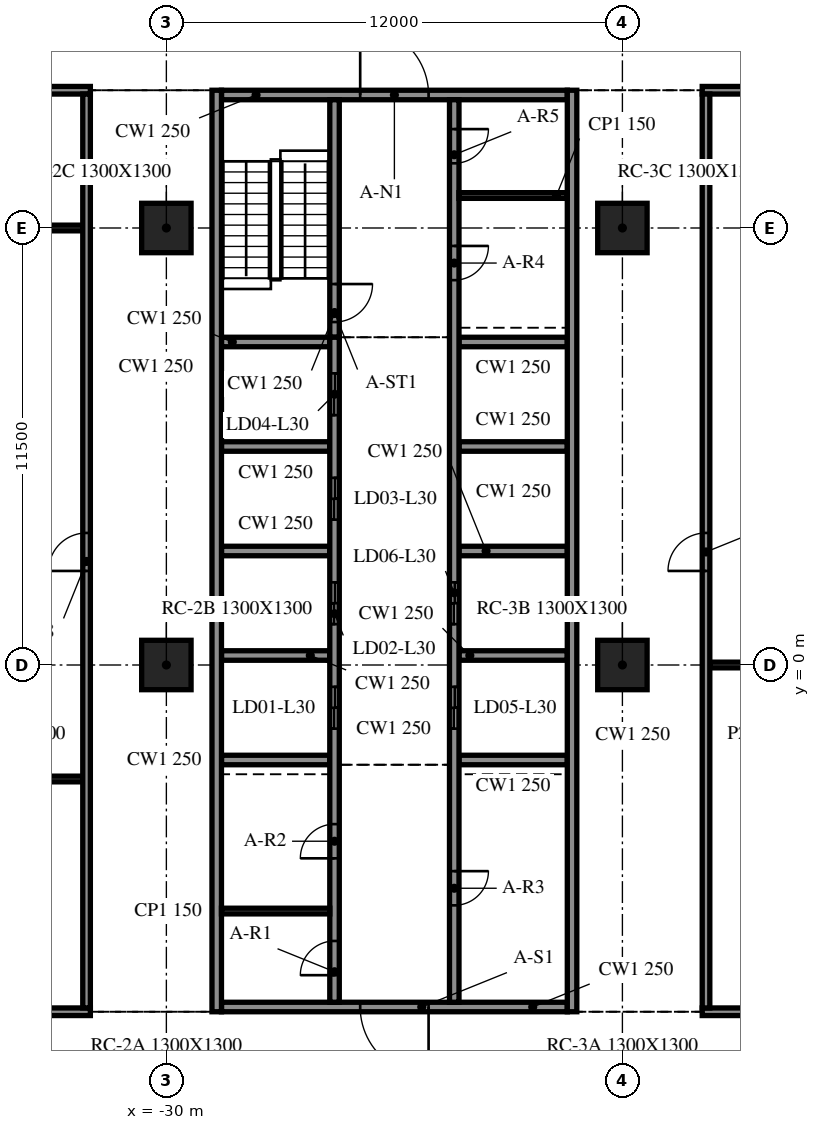
"""IFC4 building model, lengths in metres.
Left out: names, types, materials, properties, quantities, classifications, styles, units other than length and angle.
Written with IfcOpenShell. Run it as: python <this file> out.ifc"""

import sys

from ifc_helpers import new_model, si_unit, direction, frame, frame_2d, origin, origin_2d, place, context, subcontext, project, spatial, rectangle, extrude, element, fill, save


model = new_model("IFC4")
c1 = context("Model", 3, precision=1e-05, world=origin(), true_north=direction((0.0, 1.0)))
c2 = subcontext(c1, "Body", "Model", "MODEL_VIEW")
j1 = project(units=[si_unit("LENGTHUNIT", "METRE"), si_unit("PLANEANGLEUNIT", "RADIAN")], contexts=[c1])
p1 = place(None, origin())
s1 = spatial("IfcSite", under=j1, at=p1, CompositionType="ELEMENT")
p2 = place(p1, origin())
s2 = spatial("IfcBuilding", under=s1, at=p2, CompositionType="ELEMENT")
p3 = place(p2, frame((0.0, 0.0, 130.2)))
s3 = spatial("IfcBuildingStorey", under=s2, at=p3, CompositionType="ELEMENT", Elevation=130.2)
for number, where, z_axis, x_axis in (
    (1, (-30.0, 0.0, -0.34), (0.0, 0.0, 1.0), (1.0, 0.0, 0.0)),
    (2, (-30.0, 11.5, -0.34), (0.0, 0.0, 1.0), (1.0, 0.0, 0.0)),
    (3, (-18.0, 0.0, -0.34), (0.0, 0.0, 1.0), (1.0, 0.0, 0.0)),
    (4, (-18.0, 11.5, -0.34), (0.0, 0.0, 1.0), (1.0, 0.0, 0.0)),
):
    element("IfcColumn", number, at=place(p3, frame(where, z_axis=z_axis, x_axis=x_axis)), inside=s3, PredefinedType="COLUMN", context=c2, shape_type="SweptSolid", body=[
        extrude(rectangle(XDim=1.3, YDim=1.3, at=origin_2d()), origin(), (0.0, 0.0, 1.0), 4.1),
    ])
for number, where, z_axis, x_axis in (
    (5, (-28.675, 15.125, 0.0), (0.0, 0.0, 1.0), (0.0, -1.0, 0.0)),
    (6, (-19.325, -9.125, 0.0), (0.0, 0.0, 1.0), (0.0, 1.0, 0.0)),
):
    element("IfcWall", number, at=place(p3, frame(where, z_axis=z_axis, x_axis=x_axis)), inside=s3, PredefinedType="SOLIDWALL", context=c2, shape_type="SweptSolid", body=[
        extrude(rectangle(XDim=24.25, YDim=0.25, at=frame_2d((12.125, 0.0))), origin(), (0.0, 0.0, 1.0), 3.76),
    ])
p4 = place(p3, frame((-19.45, -9.0, 0.0), z_axis=(0.0, 0.0, 1.0), x_axis=(-1.0, 0.0, 0.0)))
e7 = element("IfcWall", 7, at=p4, inside=s3, PredefinedType="SOLIDWALL", context=c2, shape_type="SweptSolid", body=[
    extrude(rectangle(XDim=9.1, YDim=0.25, at=frame_2d((4.55, 0.0))), origin(), (0.0, 0.0, 1.0), 3.76),
])
p5 = place(p4, frame((3.65, 0.0, 0.0)))
e8 = element("IfcOpeningElement", 8, at=p5, cuts=e7, PredefinedType="OPENING", context=c2, shape_type="SweptSolid", body=[
    extrude(rectangle(XDim=1.8, YDim=2.1, at=frame_2d((0.9, 1.05))), frame((0.0, 0.135, 0.0), z_axis=(0.0, -1.0, 0.0), x_axis=(1.0, 0.0, 0.0)), (0.0, 0.0, 1.0), 0.27),
])
p6 = place(p3, frame((-28.55, 15.0, 0.0), z_axis=(0.0, 0.0, 1.0), x_axis=(1.0, 0.0, 0.0)))
e9 = element("IfcWall", 9, at=p6, inside=s3, PredefinedType="SOLIDWALL", context=c2, shape_type="SweptSolid", body=[
    extrude(rectangle(XDim=9.1, YDim=0.25, at=frame_2d((4.55, 0.0))), origin(), (0.0, 0.0, 1.0), 3.76),
])
p7 = place(p6, frame((3.65, 0.0, 0.0)))
e10 = element("IfcOpeningElement", 10, at=p7, cuts=e9, PredefinedType="OPENING", context=c2, shape_type="SweptSolid", body=[
    extrude(rectangle(XDim=1.8, YDim=2.1, at=frame_2d((0.9, 1.05))), frame((0.0, 0.135, 0.0), z_axis=(0.0, -1.0, 0.0), x_axis=(1.0, 0.0, 0.0)), (0.0, 0.0, 1.0), 0.27),
])
p8 = place(p3, frame((-25.575, -8.875, 0.0), z_axis=(0.0, 0.0, 1.0), x_axis=(0.0, 1.0, 0.0)))
e11 = element("IfcWall", 11, at=p8, inside=s3, PredefinedType="SOLIDWALL", context=c2, shape_type="SweptSolid", body=[
    extrude(rectangle(XDim=17.5, YDim=0.25, at=frame_2d((8.75, 0.0))), origin(), (0.0, 0.0, 1.0), 3.76),
])
p9 = place(p8, frame((7.2, 0.0, 0.0)))
e12 = element("IfcOpeningElement", 12, at=p9, cuts=e11, PredefinedType="OPENING", context=c2, shape_type="SweptSolid", body=[
    extrude(rectangle(XDim=1.1, YDim=2.1, at=frame_2d((0.55, 1.05))), frame((0.0, 0.135, 0.0), z_axis=(0.0, -1.0, 0.0), x_axis=(1.0, 0.0, 0.0)), (0.0, 0.0, 1.0), 0.27),
])
p10 = place(p8, frame((9.95, 0.0, 0.0)))
e13 = element("IfcOpeningElement", 13, at=p10, cuts=e11, PredefinedType="OPENING", context=c2, shape_type="SweptSolid", body=[
    extrude(rectangle(XDim=1.1, YDim=2.1, at=frame_2d((0.55, 1.05))), frame((0.0, 0.135, 0.0), z_axis=(0.0, -1.0, 0.0), x_axis=(1.0, 0.0, 0.0)), (0.0, 0.0, 1.0), 0.27),
])
p11 = place(p8, frame((12.7, 0.0, 0.0)))
e14 = element("IfcOpeningElement", 14, at=p11, cuts=e11, PredefinedType="OPENING", context=c2, shape_type="SweptSolid", body=[
    extrude(rectangle(XDim=1.1, YDim=2.1, at=frame_2d((0.55, 1.05))), frame((0.0, 0.135, 0.0), z_axis=(0.0, -1.0, 0.0), x_axis=(1.0, 0.0, 0.0)), (0.0, 0.0, 1.0), 0.27),
])
p12 = place(p8, frame((15.45, 0.0, 0.0)))
e15 = element("IfcOpeningElement", 15, at=p12, cuts=e11, PredefinedType="OPENING", context=c2, shape_type="SweptSolid", body=[
    extrude(rectangle(XDim=1.1, YDim=2.1, at=frame_2d((0.55, 1.05))), frame((0.0, 0.135, 0.0), z_axis=(0.0, -1.0, 0.0), x_axis=(1.0, 0.0, 0.0)), (0.0, 0.0, 1.0), 0.27),
])
p13 = place(p8, frame((0.712, 0.0, 0.0)))
e16 = element("IfcOpeningElement", 16, at=p13, cuts=e11, PredefinedType="OPENING", context=c2, shape_type="SweptSolid", body=[
    extrude(rectangle(XDim=0.9, YDim=2.1, at=frame_2d((0.45, 1.05))), frame((0.0, 0.135, 0.0), z_axis=(0.0, -1.0, 0.0), x_axis=(1.0, 0.0, 0.0)), (0.0, 0.0, 1.0), 0.27),
])
p14 = place(p8, frame((3.788, 0.0, 0.0)))
e17 = element("IfcOpeningElement", 17, at=p14, cuts=e11, PredefinedType="OPENING", context=c2, shape_type="SweptSolid", body=[
    extrude(rectangle(XDim=0.9, YDim=2.1, at=frame_2d((0.45, 1.05))), frame((0.0, 0.135, 0.0), z_axis=(0.0, -1.0, 0.0), x_axis=(1.0, 0.0, 0.0)), (0.0, 0.0, 1.0), 0.27),
])
p15 = place(p3, frame((-25.575, 14.875, 0.0), z_axis=(0.0, 0.0, 1.0), x_axis=(0.0, -1.0, 0.0)))
e18 = element("IfcWall", 18, at=p15, inside=s3, PredefinedType="SOLIDWALL", context=c2, shape_type="SweptSolid", body=[
    extrude(rectangle(XDim=6.25, YDim=0.25, at=frame_2d((3.125, 0.0))), origin(), (0.0, 0.0, 1.0), 3.76),
])
p16 = place(p15, frame((4.85, 0.0, 0.0)))
e19 = element("IfcOpeningElement", 19, at=p16, cuts=e18, PredefinedType="OPENING", context=c2, shape_type="SweptSolid", body=[
    extrude(rectangle(XDim=1.0, YDim=2.1, at=frame_2d((0.5, 1.05))), frame((0.0, 0.135, 0.0), z_axis=(0.0, -1.0, 0.0), x_axis=(1.0, 0.0, 0.0)), (0.0, 0.0, 1.0), 0.27),
])
p17 = place(p3, frame((-22.425, 14.875, 0.0), z_axis=(0.0, 0.0, 1.0), x_axis=(0.0, -1.0, 0.0)))
e20 = element("IfcWall", 20, at=p17, inside=s3, PredefinedType="SOLIDWALL", context=c2, shape_type="SweptSolid", body=[
    extrude(rectangle(XDim=23.75, YDim=0.25, at=frame_2d((11.875, 0.0))), origin(), (0.0, 0.0, 1.0), 3.76),
])
p18 = place(p17, frame((15.45, 0.0, 0.0)))
e21 = element("IfcOpeningElement", 21, at=p18, cuts=e20, PredefinedType="OPENING", context=c2, shape_type="SweptSolid", body=[
    extrude(rectangle(XDim=1.1, YDim=2.1, at=frame_2d((0.55, 1.05))), frame((0.0, 0.135, 0.0), z_axis=(0.0, -1.0, 0.0), x_axis=(1.0, 0.0, 0.0)), (0.0, 0.0, 1.0), 0.27),
])
p19 = place(p17, frame((12.7, 0.0, 0.0)))
e22 = element("IfcOpeningElement", 22, at=p19, cuts=e20, PredefinedType="OPENING", context=c2, shape_type="SweptSolid", body=[
    extrude(rectangle(XDim=1.1, YDim=2.1, at=frame_2d((0.55, 1.05))), frame((0.0, 0.135, 0.0), z_axis=(0.0, -1.0, 0.0), x_axis=(1.0, 0.0, 0.0)), (0.0, 0.0, 1.0), 0.27),
])
p20 = place(p17, frame((20.3, 0.0, 0.0)))
e23 = element("IfcOpeningElement", 23, at=p20, cuts=e20, PredefinedType="OPENING", context=c2, shape_type="SweptSolid", body=[
    extrude(rectangle(XDim=0.9, YDim=2.1, at=frame_2d((0.45, 1.05))), frame((0.0, 0.135, 0.0), z_axis=(0.0, -1.0, 0.0), x_axis=(1.0, 0.0, 0.0)), (0.0, 0.0, 1.0), 0.27),
])
p21 = place(p17, frame((3.847, 0.0, 0.0)))
e24 = element("IfcOpeningElement", 24, at=p21, cuts=e20, PredefinedType="OPENING", context=c2, shape_type="SweptSolid", body=[
    extrude(rectangle(XDim=0.9, YDim=2.1, at=frame_2d((0.45, 1.05))), frame((0.0, 0.135, 0.0), z_axis=(0.0, -1.0, 0.0), x_axis=(1.0, 0.0, 0.0)), (0.0, 0.0, 1.0), 0.27),
])
p22 = place(p17, frame((0.772, 0.0, 0.0)))
e25 = element("IfcOpeningElement", 25, at=p22, cuts=e20, PredefinedType="OPENING", context=c2, shape_type="SweptSolid", body=[
    extrude(rectangle(XDim=0.9, YDim=2.1, at=frame_2d((0.45, 1.05))), frame((0.0, 0.135, 0.0), z_axis=(0.0, -1.0, 0.0), x_axis=(1.0, 0.0, 0.0)), (0.0, 0.0, 1.0), 0.27),
])
for number, where, z_axis, x_axis in (
    (26, (-28.55, -2.5, 0.0), (0.0, 0.0, 1.0), (1.0, 0.0, 0.0)),
    (27, (-28.55, 0.25, 0.0), (0.0, 0.0, 1.0), (1.0, 0.0, 0.0)),
    (28, (-28.55, 3.0, 0.0), (0.0, 0.0, 1.0), (1.0, 0.0, 0.0)),
    (29, (-28.55, 5.75, 0.0), (0.0, 0.0, 1.0), (1.0, 0.0, 0.0)),
    (30, (-28.55, 8.5, 0.0), (0.0, 0.0, 1.0), (1.0, 0.0, 0.0)),
    (31, (-22.3, -2.5, 0.0), (0.0, 0.0, 1.0), (1.0, 0.0, 0.0)),
    (32, (-22.3, 0.25, 0.0), (0.0, 0.0, 1.0), (1.0, 0.0, 0.0)),
    (33, (-22.3, 3.0, 0.0), (0.0, 0.0, 1.0), (1.0, 0.0, 0.0)),
    (34, (-22.3, 5.75, 0.0), (0.0, 0.0, 1.0), (1.0, 0.0, 0.0)),
    (35, (-22.3, 8.5, 0.0), (0.0, 0.0, 1.0), (1.0, 0.0, 0.0)),
):
    element("IfcWall", number, at=place(p3, frame(where, z_axis=z_axis, x_axis=x_axis)), inside=s3, PredefinedType="SOLIDWALL", context=c2, shape_type="SweptSolid", body=[
        extrude(rectangle(XDim=2.85, YDim=0.25, at=frame_2d((1.425, 0.0))), origin(), (0.0, 0.0, 1.0), 3.76),
    ])
for number, where, z_axis, x_axis in (
    (36, (-28.55, -6.475, 0.0), (0.0, 0.0, 1.0), (1.0, 0.0, 0.0)),
    (37, (-22.3, 12.355, 0.0), (0.0, 0.0, 1.0), (1.0, 0.0, 0.0)),
):
    element("IfcWall", number, at=place(p3, frame(where, z_axis=z_axis, x_axis=x_axis)), inside=s3, PredefinedType="PARTITIONING", context=c2, shape_type="SweptSolid", body=[
        extrude(rectangle(XDim=2.85, YDim=0.15, at=frame_2d((1.425, 0.0))), origin(), (0.0, 0.0, 1.0), 3.76),
    ])
p23 = place(p3, frame((-45.95, -9.125, 0.0), z_axis=(0.0, 0.0, 1.0), x_axis=(1.0, 0.0, 0.0)))
e38 = element("IfcWall", 38, at=p23, inside=s3, PredefinedType="PARTITIONING", context=c2, shape_type="SweptSolid", body=[
    extrude(rectangle(XDim=13.95, YDim=0.2, at=frame_2d((6.975, 0.0))), origin(), (0.0, 0.0, 1.0), 3.76),
])
p24 = place(p23, frame((5.5, 0.0, 0.0)))
e39 = element("IfcOpeningElement", 39, at=p24, cuts=e38, PredefinedType="OPENING", context=c2, shape_type="SweptSolid", body=[
    extrude(rectangle(XDim=1.2, YDim=2.1, at=frame_2d((0.6, 1.05))), frame((0.0, 0.11, 0.0), z_axis=(0.0, -1.0, 0.0), x_axis=(1.0, 0.0, 0.0)), (0.0, 0.0, 1.0), 0.22),
])
p25 = place(p23, frame((7.3, 0.0, 0.0)))
e40 = element("IfcOpeningElement", 40, at=p25, cuts=e38, PredefinedType="OPENING", context=c2, shape_type="SweptSolid", body=[
    extrude(rectangle(XDim=1.2, YDim=2.1, at=frame_2d((0.6, 1.05))), frame((0.0, 0.11, 0.0), z_axis=(0.0, -1.0, 0.0), x_axis=(1.0, 0.0, 0.0)), (0.0, 0.0, 1.0), 0.22),
])
p26 = place(p3, frame((-15.9, -9.125, 0.0), z_axis=(0.0, 0.0, 1.0), x_axis=(1.0, 0.0, 0.0)))
e41 = element("IfcWall", 41, at=p26, inside=s3, PredefinedType="PARTITIONING", context=c2, shape_type="SweptSolid", body=[
    extrude(rectangle(XDim=7.7, YDim=0.2, at=frame_2d((3.85, 0.0))), origin(), (0.0, 0.0, 1.0), 3.76),
])
p27 = place(p26, frame((3.3, 0.0, 0.0)))
e42 = element("IfcOpeningElement", 42, at=p27, cuts=e41, PredefinedType="OPENING", context=c2, shape_type="SweptSolid", body=[
    extrude(rectangle(XDim=1.0, YDim=2.1, at=frame_2d((0.5, 1.05))), frame((0.0, 0.11, 0.0), z_axis=(0.0, -1.0, 0.0), x_axis=(1.0, 0.0, 0.0)), (0.0, 0.0, 1.0), 0.22),
])
p28 = place(p3, frame((-45.75, -3.0, 0.0), z_axis=(0.0, 0.0, 1.0), x_axis=(1.0, 0.0, 0.0)))
e43 = element("IfcWall", 43, at=p28, inside=s3, PredefinedType="PARTITIONING", context=c2, shape_type="SweptSolid", body=[
    extrude(rectangle(XDim=13.55, YDim=0.15, at=frame_2d((6.775, 0.0))), origin(), (0.0, 0.0, 1.0), 3.76),
])
p29 = place(p3, frame((-15.7, 0.0, 0.0), z_axis=(0.0, 0.0, 1.0), x_axis=(1.0, 0.0, 0.0)))
e44 = element("IfcWall", 44, at=p29, inside=s3, PredefinedType="PARTITIONING", context=c2, shape_type="SweptSolid", body=[
    extrude(rectangle(XDim=7.3, YDim=0.15, at=frame_2d((3.65, 0.0))), origin(), (0.0, 0.0, 1.0), 3.76),
])
p30 = place(p3, frame((-41.35, 11.5, 0.0), z_axis=(0.0, 0.0, 1.0), x_axis=(1.0, 0.0, 0.0)))
e45 = element("IfcWall", 45, at=p30, inside=s3, PredefinedType="PARTITIONING", context=c2, shape_type="SweptSolid", body=[
    extrude(rectangle(XDim=9.15, YDim=0.15, at=frame_2d((4.575, 0.0))), origin(), (0.0, 0.0, 1.0), 3.76),
])
p31 = place(p3, frame((-45.95, 15.125, 0.0), z_axis=(0.0, 0.0, 1.0), x_axis=(1.0, 0.0, 0.0)))
e46 = element("IfcWall", 46, at=p31, inside=s3, PredefinedType="PARTITIONING", context=c2, shape_type="SweptSolid", body=[
    extrude(rectangle(XDim=13.95, YDim=0.2, at=frame_2d((6.975, 0.0))), origin(), (0.0, 0.0, 1.0), 3.76),
])
p32 = place(p31, frame((5.7, 0.0, 0.0)))
e47 = element("IfcOpeningElement", 47, at=p32, cuts=e46, PredefinedType="OPENING", context=c2, shape_type="SweptSolid", body=[
    extrude(rectangle(XDim=1.0, YDim=2.1, at=frame_2d((0.5, 1.05))), frame((0.0, 0.11, 0.0), z_axis=(0.0, -1.0, 0.0), x_axis=(1.0, 0.0, 0.0)), (0.0, 0.0, 1.0), 0.22),
])
p33 = place(p31, frame((7.3, 0.0, 0.0)))
e48 = element("IfcOpeningElement", 48, at=p33, cuts=e46, PredefinedType="OPENING", context=c2, shape_type="SweptSolid", body=[
    extrude(rectangle(XDim=1.0, YDim=2.1, at=frame_2d((0.5, 1.05))), frame((0.0, 0.11, 0.0), z_axis=(0.0, -1.0, 0.0), x_axis=(1.0, 0.0, 0.0)), (0.0, 0.0, 1.0), 0.22),
])
p34 = place(p3, frame((-15.9, 15.125, 0.0), z_axis=(0.0, 0.0, 1.0), x_axis=(1.0, 0.0, 0.0)))
e49 = element("IfcWall", 49, at=p34, inside=s3, PredefinedType="PARTITIONING", context=c2, shape_type="SweptSolid", body=[
    extrude(rectangle(XDim=7.7, YDim=0.2, at=frame_2d((3.85, 0.0))), origin(), (0.0, 0.0, 1.0), 3.76),
])
p35 = place(p3, frame((-32.1, -9.025, 0.0), z_axis=(0.0, 0.0, 1.0), x_axis=(0.0, 1.0, 0.0)))
e50 = element("IfcWall", 50, at=p35, inside=s3, PredefinedType="PARTITIONING", context=c2, shape_type="SweptSolid", body=[
    extrude(rectangle(XDim=24.05, YDim=0.2, at=frame_2d((12.025, 0.0))), origin(), (0.0, 0.0, 1.0), 3.76),
])
p36 = place(p35, frame((11.5, 0.0, 0.0)))
e51 = element("IfcOpeningElement", 51, at=p36, cuts=e50, PredefinedType="OPENING", context=c2, shape_type="SweptSolid", body=[
    extrude(rectangle(XDim=1.0, YDim=2.1, at=frame_2d((0.5, 1.05))), frame((0.0, 0.11, 0.0), z_axis=(0.0, -1.0, 0.0), x_axis=(1.0, 0.0, 0.0)), (0.0, 0.0, 1.0), 0.22),
])
p37 = place(p3, frame((-15.8, -9.025, 0.0), z_axis=(0.0, 0.0, 1.0), x_axis=(0.0, 1.0, 0.0)))
e52 = element("IfcWall", 52, at=p37, inside=s3, PredefinedType="PARTITIONING", context=c2, shape_type="SweptSolid", body=[
    extrude(rectangle(XDim=24.05, YDim=0.2, at=frame_2d((12.025, 0.0))), origin(), (0.0, 0.0, 1.0), 3.76),
])
p38 = place(p37, frame((11.5, 0.0, 0.0)))
e53 = element("IfcOpeningElement", 53, at=p38, cuts=e52, PredefinedType="OPENING", context=c2, shape_type="SweptSolid", body=[
    extrude(rectangle(XDim=1.0, YDim=2.1, at=frame_2d((0.5, 1.05))), frame((0.0, 0.11, 0.0), z_axis=(0.0, -1.0, 0.0), x_axis=(1.0, 0.0, 0.0)), (0.0, 0.0, 1.0), 0.22),
])
p39 = place(p5, origin())
e54 = element("IfcDoor", 54, at=p39, inside=s3, OperationType="DOUBLE_DOOR_SINGLE_SWING", PredefinedType="DOOR", context=c2, shape_type="SweptSolid", body=[
    extrude(rectangle(XDim=1.8, YDim=2.1, at=frame_2d((0.9, 1.05))), frame((0.0, 0.025, 0.0), z_axis=(0.0, -1.0, 0.0), x_axis=(1.0, 0.0, 0.0)), (0.0, 0.0, 1.0), 0.05),
])
fill(e8, e54)
p40 = place(p7, origin())
e55 = element("IfcDoor", 55, at=p40, inside=s3, OperationType="DOUBLE_DOOR_SINGLE_SWING", PredefinedType="DOOR", context=c2, shape_type="SweptSolid", body=[
    extrude(rectangle(XDim=1.8, YDim=2.1, at=frame_2d((0.9, 1.05))), frame((0.0, 0.025, 0.0), z_axis=(0.0, -1.0, 0.0), x_axis=(1.0, 0.0, 0.0)), (0.0, 0.0, 1.0), 0.05),
])
fill(e10, e55)
p41 = place(p18, origin())
e56 = element("IfcDoor", 56, at=p41, inside=s3, OperationType="DOUBLE_DOOR_SLIDING", PredefinedType="DOOR", context=c2, shape_type="SweptSolid", body=[
    extrude(rectangle(XDim=1.1, YDim=2.1, at=frame_2d((0.55, 1.05))), frame((0.0, 0.025, 0.0), z_axis=(0.0, -1.0, 0.0), x_axis=(1.0, 0.0, 0.0)), (0.0, 0.0, 1.0), 0.05),
])
fill(e21, e56)
p42 = place(p19, origin())
e57 = element("IfcDoor", 57, at=p42, inside=s3, OperationType="DOUBLE_DOOR_SLIDING", PredefinedType="DOOR", context=c2, shape_type="SweptSolid", body=[
    extrude(rectangle(XDim=1.1, YDim=2.1, at=frame_2d((0.55, 1.05))), frame((0.0, 0.025, 0.0), z_axis=(0.0, -1.0, 0.0), x_axis=(1.0, 0.0, 0.0)), (0.0, 0.0, 1.0), 0.05),
])
fill(e22, e57)
p43 = place(p9, origin())
e58 = element("IfcDoor", 58, at=p43, inside=s3, OperationType="DOUBLE_DOOR_SLIDING", PredefinedType="DOOR", context=c2, shape_type="SweptSolid", body=[
    extrude(rectangle(XDim=1.1, YDim=2.1, at=frame_2d((0.55, 1.05))), frame((0.0, 0.025, 0.0), z_axis=(0.0, -1.0, 0.0), x_axis=(1.0, 0.0, 0.0)), (0.0, 0.0, 1.0), 0.05),
])
fill(e12, e58)
p44 = place(p10, origin())
e59 = element("IfcDoor", 59, at=p44, inside=s3, OperationType="DOUBLE_DOOR_SLIDING", PredefinedType="DOOR", context=c2, shape_type="SweptSolid", body=[
    extrude(rectangle(XDim=1.1, YDim=2.1, at=frame_2d((0.55, 1.05))), frame((0.0, 0.025, 0.0), z_axis=(0.0, -1.0, 0.0), x_axis=(1.0, 0.0, 0.0)), (0.0, 0.0, 1.0), 0.05),
])
fill(e13, e59)
p45 = place(p11, origin())
e60 = element("IfcDoor", 60, at=p45, inside=s3, OperationType="DOUBLE_DOOR_SLIDING", PredefinedType="DOOR", context=c2, shape_type="SweptSolid", body=[
    extrude(rectangle(XDim=1.1, YDim=2.1, at=frame_2d((0.55, 1.05))), frame((0.0, 0.025, 0.0), z_axis=(0.0, -1.0, 0.0), x_axis=(1.0, 0.0, 0.0)), (0.0, 0.0, 1.0), 0.05),
])
fill(e14, e60)
p46 = place(p12, origin())
e61 = element("IfcDoor", 61, at=p46, inside=s3, OperationType="DOUBLE_DOOR_SLIDING", PredefinedType="DOOR", context=c2, shape_type="SweptSolid", body=[
    extrude(rectangle(XDim=1.1, YDim=2.1, at=frame_2d((0.55, 1.05))), frame((0.0, 0.025, 0.0), z_axis=(0.0, -1.0, 0.0), x_axis=(1.0, 0.0, 0.0)), (0.0, 0.0, 1.0), 0.05),
])
fill(e15, e61)
p47 = place(p13, origin())
e62 = element("IfcDoor", 62, at=p47, inside=s3, OperationType="SINGLE_SWING_LEFT", PredefinedType="DOOR", context=c2, shape_type="SweptSolid", body=[
    extrude(rectangle(XDim=0.9, YDim=2.1, at=frame_2d((0.45, 1.05))), frame((0.0, 0.025, 0.0), z_axis=(0.0, -1.0, 0.0), x_axis=(1.0, 0.0, 0.0)), (0.0, 0.0, 1.0), 0.05),
])
fill(e16, e62)
p48 = place(p14, origin())
e63 = element("IfcDoor", 63, at=p48, inside=s3, OperationType="SINGLE_SWING_RIGHT", PredefinedType="DOOR", context=c2, shape_type="SweptSolid", body=[
    extrude(rectangle(XDim=0.9, YDim=2.1, at=frame_2d((0.45, 1.05))), frame((0.0, 0.025, 0.0), z_axis=(0.0, -1.0, 0.0), x_axis=(1.0, 0.0, 0.0)), (0.0, 0.0, 1.0), 0.05),
])
fill(e17, e63)
p49 = place(p20, origin())
e64 = element("IfcDoor", 64, at=p49, inside=s3, OperationType="SINGLE_SWING_LEFT", PredefinedType="DOOR", context=c2, shape_type="SweptSolid", body=[
    extrude(rectangle(XDim=0.9, YDim=2.1, at=frame_2d((0.45, 1.05))), frame((0.0, 0.025, 0.0), z_axis=(0.0, -1.0, 0.0), x_axis=(1.0, 0.0, 0.0)), (0.0, 0.0, 1.0), 0.05),
])
fill(e23, e64)
p50 = place(p21, origin())
e65 = element("IfcDoor", 65, at=p50, inside=s3, OperationType="SINGLE_SWING_RIGHT", PredefinedType="DOOR", context=c2, shape_type="SweptSolid", body=[
    extrude(rectangle(XDim=0.9, YDim=2.1, at=frame_2d((0.45, 1.05))), frame((0.0, 0.025, 0.0), z_axis=(0.0, -1.0, 0.0), x_axis=(1.0, 0.0, 0.0)), (0.0, 0.0, 1.0), 0.05),
])
fill(e24, e65)
p51 = place(p22, origin())
e66 = element("IfcDoor", 66, at=p51, inside=s3, OperationType="SINGLE_SWING_LEFT", PredefinedType="DOOR", context=c2, shape_type="SweptSolid", body=[
    extrude(rectangle(XDim=0.9, YDim=2.1, at=frame_2d((0.45, 1.05))), frame((0.0, 0.025, 0.0), z_axis=(0.0, -1.0, 0.0), x_axis=(1.0, 0.0, 0.0)), (0.0, 0.0, 1.0), 0.05),
])
fill(e25, e66)
p52 = place(p16, origin())
e67 = element("IfcDoor", 67, at=p52, inside=s3, OperationType="SINGLE_SWING_RIGHT", PredefinedType="DOOR", context=c2, shape_type="SweptSolid", body=[
    extrude(rectangle(XDim=1.0, YDim=2.1, at=frame_2d((0.5, 1.05))), frame((0.0, 0.025, 0.0), z_axis=(0.0, -1.0, 0.0), x_axis=(1.0, 0.0, 0.0)), (0.0, 0.0, 1.0), 0.05),
])
fill(e19, e67)
p53 = place(p36, origin())
e68 = element("IfcDoor", 68, at=p53, inside=s3, OperationType="SINGLE_SWING_LEFT", PredefinedType="DOOR", context=c2, shape_type="SweptSolid", body=[
    extrude(rectangle(XDim=1.0, YDim=2.1, at=frame_2d((0.5, 1.05))), frame((0.0, 0.025, 0.0), z_axis=(0.0, -1.0, 0.0), x_axis=(1.0, 0.0, 0.0)), (0.0, 0.0, 1.0), 0.05),
])
fill(e51, e68)
p54 = place(p38, origin())
e69 = element("IfcDoor", 69, at=p54, inside=s3, OperationType="SINGLE_SWING_RIGHT", PredefinedType="DOOR", context=c2, shape_type="SweptSolid", body=[
    extrude(rectangle(XDim=1.0, YDim=2.1, at=frame_2d((0.5, 1.05))), frame((0.0, 0.025, 0.0), z_axis=(0.0, -1.0, 0.0), x_axis=(1.0, 0.0, 0.0)), (0.0, 0.0, 1.0), 0.05),
])
fill(e53, e69)
save(model, sys.argv[1])
